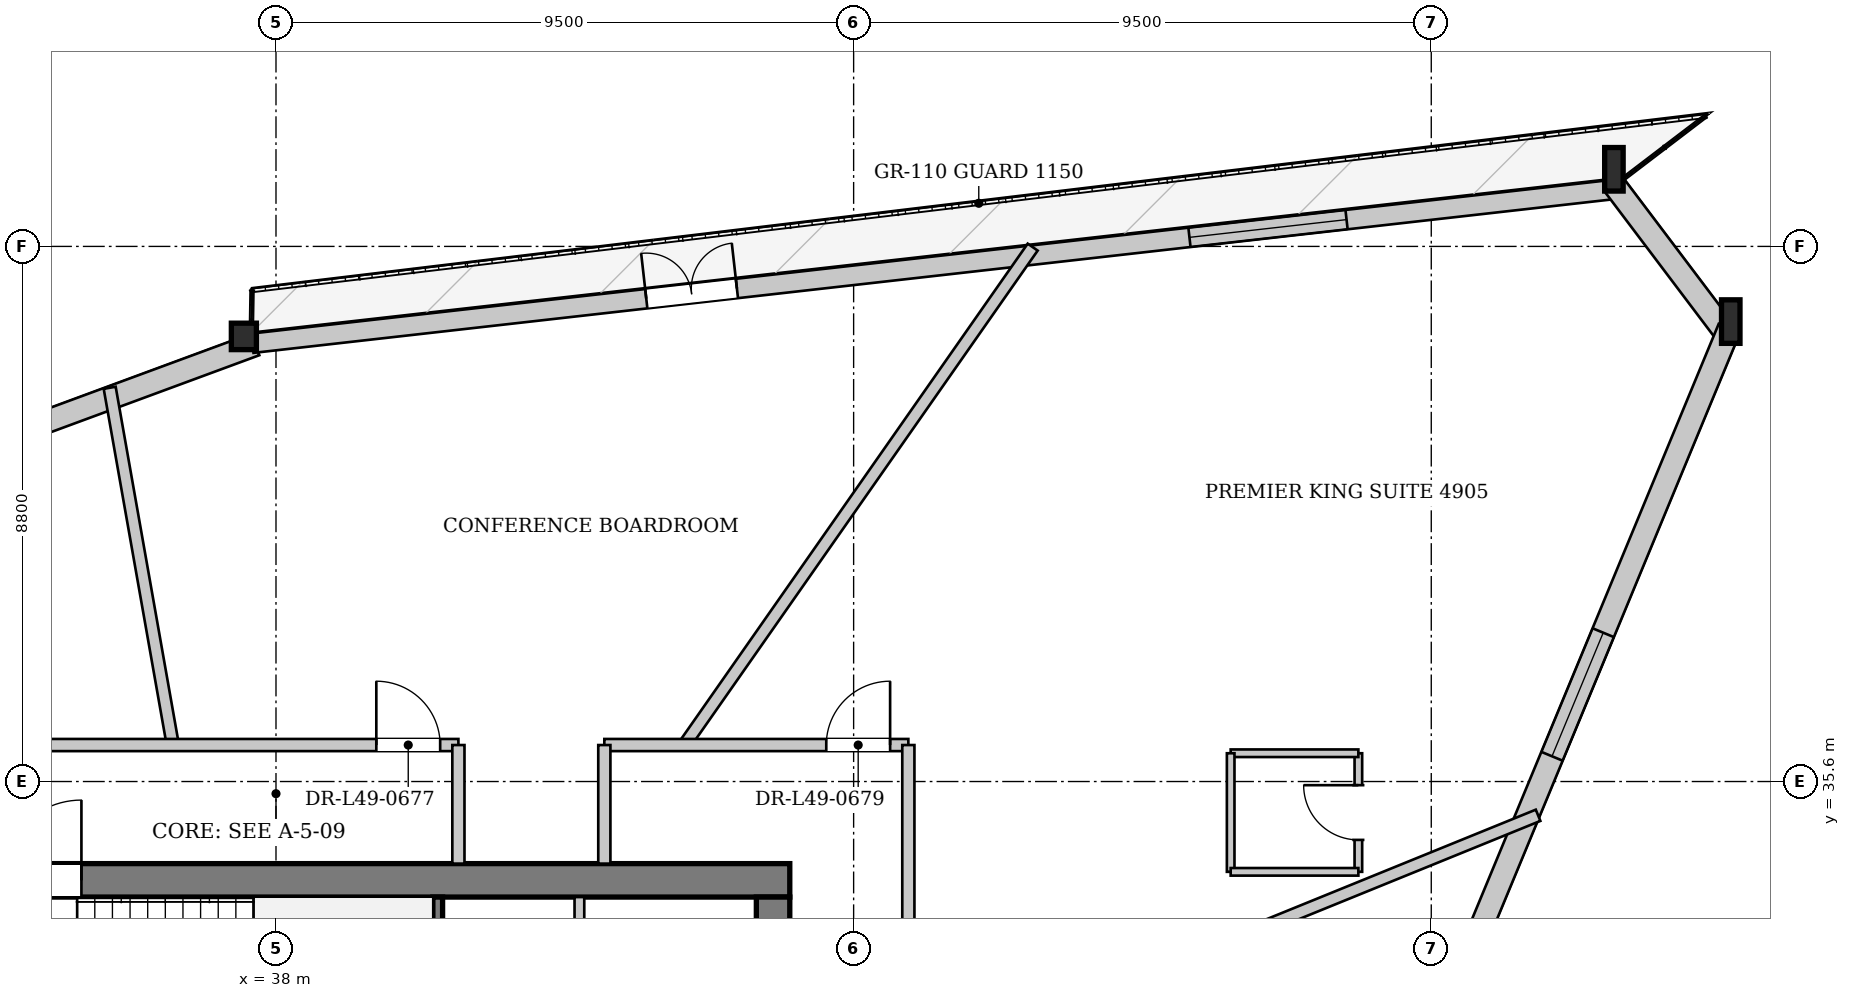
"""IFC4 building model, lengths in metres.
Left out: names, types, materials, properties, quantities, classifications, styles, units other than length and angle.
Written with IfcOpenShell. Run it as: python <this file> out.ifc"""

import sys

from ifc_helpers import new_model, si_unit, direction, frame, frame_2d, origin, origin_2d, place, context, subcontext, project, spatial, rectangle, i_section, extrude, source, transform, mapped, element, fill, save


model = new_model("IFC4")
c1 = context("Model", 3, precision=1e-05, world=origin(), true_north=direction((0.0, 1.0)))
c2 = subcontext(c1, "Body", "Model", "MODEL_VIEW")
j1 = project(units=[si_unit("LENGTHUNIT", "METRE"), si_unit("PLANEANGLEUNIT", "RADIAN")], contexts=[c1])
p1 = place(None, origin())
s1 = spatial("IfcSite", under=j1, at=p1, CompositionType="ELEMENT")
p2 = place(p1, origin())
s2 = spatial("IfcBuilding", under=s1, at=p2, CompositionType="ELEMENT")
p3 = place(p2, frame((0.0, 0.0, 185.65)))
s3 = spatial("IfcBuildingStorey", under=s2, at=p3, CompositionType="ELEMENT", Elevation=185.65)
m1 = source(origin(), c2, "Body", "SweptSolid", [
    extrude(i_section(OverallWidth=0.304, OverallDepth=0.716, WebThickness=0.021, FlangeThickness=0.04, at=origin_2d()), origin(), (0.0, 0.0, 1.0), 3.418),
])
p4 = place(p3, frame((62.079, 42.982, 0.0), z_axis=(-0.089706079585, 0.106418836451, 0.990266555294), x_axis=(-0.764591737576, -0.644514914359, 0.0)))
e1 = element("IfcColumn", 1, at=p4, inside=s3, PredefinedType="COLUMN", context=c2, shape_type="MappedRepresentation", body=[
    mapped(m1, transform((0.0, 0.0, 0.0), x_axis=(1.0, 0.0, 0.0), y_axis=(0.0, 1.0, 0.0), z_axis=(0.0, 0.0, 1.0), scale=1.0)),
])
m2 = source(origin(), c2, "Body", "SweptSolid", [
    extrude(i_section(OverallWidth=0.304, OverallDepth=0.716, WebThickness=0.021, FlangeThickness=0.04, at=origin_2d()), origin(), (0.0, 0.0, 1.0), 3.414),
])
p5 = place(p3, frame((60.165, 45.517, 0.0), z_axis=(-0.094542362552, 0.08882119084, 0.991550572458), x_axis=(-0.684710959005, -0.72881472448, 0.0)))
e2 = element("IfcColumn", 2, at=p5, inside=s3, PredefinedType="COLUMN", context=c2, shape_type="MappedRepresentation", body=[
    mapped(m2, transform((0.0, 0.0, 0.0), x_axis=(1.0, 0.0, 0.0), y_axis=(0.0, 1.0, 0.0), z_axis=(0.0, 0.0, 1.0), scale=1.0)),
])
m3 = source(origin(), c2, "Body", "SweptSolid", [
    extrude(i_section(OverallWidth=0.412, OverallDepth=0.435, WebThickness=0.031, FlangeThickness=0.05, at=origin_2d()), origin(), (0.0, 0.0, 1.0), 3.395),
])
p6 = place(p3, frame((37.594, 42.967, 0.0), z_axis=(-0.072052690953, -0.027684916185, 0.997016527016), x_axis=(0.35866692441, -0.933465605866, 0.0)))
e3 = element("IfcColumn", 3, at=p6, inside=s3, PredefinedType="COLUMN", context=c2, shape_type="MappedRepresentation", body=[
    mapped(m3, transform((0.0, 0.0, 0.0), x_axis=(1.0, 0.0, 0.0), y_axis=(0.0, 1.0, 0.0), z_axis=(0.0, 0.0, 1.0), scale=1.0)),
])
p7 = place(p3, frame((16.351, 34.922, 0.0), z_axis=(0.0, 0.0, 1.0), x_axis=(0.938118125274, 0.346315438629, 0.0)))
e4 = element("IfcWall", 4, at=p7, inside=s3, PredefinedType="SOLIDWALL", context=c2, shape_type="SweptSolid", body=[
    extrude(rectangle(XDim=22.715, YDim=0.38, at=frame_2d((11.357, 0.0))), origin(), (0.0, 0.0, 1.0), 2.722),
])
p8 = place(p7, frame((4.81, 0.0, 0.352)))
e5 = element("IfcOpeningElement", 5, at=p8, cuts=e4, PredefinedType="OPENING", context=c2, shape_type="SweptSolid", body=[
    extrude(rectangle(XDim=2.2, YDim=2.25, at=frame_2d((1.1, 1.125))), frame((0.0, 0.2, 0.0), z_axis=(0.0, -1.0, 0.0), x_axis=(1.0, 0.0, 0.0)), (0.0, 0.0, 1.0), 0.4),
])
p9 = place(p7, frame((15.255, 0.0, 0.352)))
e6 = element("IfcOpeningElement", 6, at=p9, cuts=e4, PredefinedType="OPENING", context=c2, shape_type="SweptSolid", body=[
    extrude(rectangle(XDim=2.2, YDim=2.25, at=frame_2d((1.1, 1.125))), frame((0.0, 0.2, 0.0), z_axis=(0.0, -1.0, 0.0), x_axis=(1.0, 0.0, 0.0)), (0.0, 0.0, 1.0), 0.4),
])
p10 = place(p3, frame((37.612, 42.808, 0.0), z_axis=(0.0, 0.0, 1.0), x_axis=(0.993680751004, 0.112243329794, 0.0)))
e7 = element("IfcWall", 7, at=p10, inside=s3, PredefinedType="SOLIDWALL", context=c2, shape_type="SweptSolid", body=[
    extrude(rectangle(XDim=22.715, YDim=0.32, at=frame_2d((11.357, 0.0))), origin(), (0.0, 0.0, 1.0), 2.722),
])
p11 = place(p10, frame((6.519, 0.0, 0.0)))
e8 = element("IfcOpeningElement", 8, at=p11, cuts=e7, PredefinedType="OPENING", context=c2, shape_type="SweptSolid", body=[
    extrude(rectangle(XDim=1.5, YDim=2.3, at=frame_2d((0.75, 1.15))), frame((0.0, 0.17, 0.0), z_axis=(0.0, -1.0, 0.0), x_axis=(1.0, 0.0, 0.0)), (0.0, 0.0, 1.0), 0.34),
])
p12 = place(p10, frame((15.509, 0.0, 0.252)))
e9 = element("IfcOpeningElement", 9, at=p12, cuts=e7, PredefinedType="OPENING", context=c2, shape_type="SweptSolid", body=[
    extrude(rectangle(XDim=2.6, YDim=2.35, at=frame_2d((1.3, 1.175))), frame((0.0, 0.17, 0.0), z_axis=(0.0, -1.0, 0.0), x_axis=(1.0, 0.0, 0.0)), (0.0, 0.0, 1.0), 0.34),
])
p13 = place(p3, frame((60.014, 45.402, 0.0), z_axis=(0.0, 0.0, 1.0), x_axis=(0.602530725423, -0.79809568657, 0.0)))
e10 = element("IfcWall", 10, at=p13, inside=s3, PredefinedType="SOLIDWALL", context=c2, shape_type="SweptSolid", body=[
    extrude(rectangle(XDim=3.176, YDim=0.38, at=frame_2d((1.588, 0.0))), origin(), (0.0, 0.0, 1.0), 2.722),
])
p14 = place(p3, frame((61.903, 43.055, 0.0), z_axis=(0.0, 0.0, 1.0), x_axis=(-0.382868163496, -0.923802992732, 0.0)))
e11 = element("IfcWall", 11, at=p14, inside=s3, PredefinedType="SOLIDWALL", context=c2, shape_type="SweptSolid", body=[
    extrude(rectangle(XDim=23.285, YDim=0.38, at=frame_2d((11.643, 0.0))), origin(), (0.0, 0.0, 1.0), 2.722),
])
p15 = place(p14, frame((5.42, 0.0, 0.352)))
e12 = element("IfcOpeningElement", 12, at=p15, cuts=e11, PredefinedType="OPENING", context=c2, shape_type="SweptSolid", body=[
    extrude(rectangle(XDim=2.2, YDim=2.25, at=frame_2d((1.1, 1.125))), frame((0.0, 0.2, 0.0), z_axis=(0.0, -1.0, 0.0), x_axis=(1.0, 0.0, 0.0)), (0.0, 0.0, 1.0), 0.4),
])
p16 = place(p14, frame((15.665, 0.0, 0.352)))
e13 = element("IfcOpeningElement", 13, at=p16, cuts=e11, PredefinedType="OPENING", context=c2, shape_type="SweptSolid", body=[
    extrude(rectangle(XDim=2.2, YDim=2.25, at=frame_2d((1.1, 1.125))), frame((0.0, 0.2, 0.0), z_axis=(0.0, -1.0, 0.0), x_axis=(1.0, 0.0, 0.0)), (0.0, 0.0, 1.0), 0.4),
])
p17 = place(p3, frame((29.55, 33.975, 0.0), z_axis=(0.0, 0.0, 1.0), x_axis=(1.0, 0.0, 0.0)))
e14 = element("IfcWall", 14, at=p17, inside=s3, PredefinedType="SHEAR", context=c2, shape_type="SweptSolid", body=[
    extrude(rectangle(XDim=16.9, YDim=0.55, at=frame_2d((8.45, 0.0))), origin(), (0.0, 0.0, 1.0), 3.33),
])
p18 = place(p17, frame((1.55, 0.0, 0.0)))
e15 = element("IfcOpeningElement", 15, at=p18, cuts=e14, PredefinedType="OPENING", context=c2, shape_type="SweptSolid", body=[
    extrude(rectangle(XDim=0.95, YDim=2.1, at=frame_2d((0.475, 1.05))), frame((0.0, 0.285, 0.0), z_axis=(0.0, -1.0, 0.0), x_axis=(1.0, 0.0, 0.0)), (0.0, 0.0, 1.0), 0.57),
])
p19 = place(p17, frame((3.93, 0.0, 0.0)))
e16 = element("IfcOpeningElement", 16, at=p19, cuts=e14, PredefinedType="OPENING", context=c2, shape_type="SweptSolid", body=[
    extrude(rectangle(XDim=1.32, YDim=2.2, at=frame_2d((0.66, 1.1))), frame((0.0, 0.285, 0.0), z_axis=(0.0, -1.0, 0.0), x_axis=(1.0, 0.0, 0.0)), (0.0, 0.0, 1.0), 0.57),
])
p20 = place(p3, frame((46.175, 33.7, 0.0), z_axis=(0.0, 0.0, 1.0), x_axis=(0.0, -1.0, 0.0)))
e17 = element("IfcWall", 17, at=p20, inside=s3, PredefinedType="SHEAR", context=c2, shape_type="SweptSolid", body=[
    extrude(rectangle(XDim=14.2, YDim=0.55, at=frame_2d((7.1, 0.0))), origin(), (0.0, 0.0, 1.0), 3.33),
])
p21 = place(p20, frame((5.18, 0.0, 0.0)))
e18 = element("IfcOpeningElement", 18, at=p21, cuts=e17, PredefinedType="OPENING", context=c2, shape_type="SweptSolid", body=[
    extrude(rectangle(XDim=1.6, YDim=2.2, at=frame_2d((0.8, 1.1))), frame((0.0, 0.285, 0.0), z_axis=(0.0, -1.0, 0.0), x_axis=(1.0, 0.0, 0.0)), (0.0, 0.0, 1.0), 0.57),
])
p22 = place(p20, frame((2.05, 0.0, 0.0)))
e19 = element("IfcOpeningElement", 19, at=p22, cuts=e17, PredefinedType="OPENING", context=c2, shape_type="SweptSolid", body=[
    extrude(rectangle(XDim=0.95, YDim=2.1, at=frame_2d((0.475, 1.05))), frame((0.0, 0.285, 0.0), z_axis=(0.0, -1.0, 0.0), x_axis=(1.0, 0.0, 0.0)), (0.0, 0.0, 1.0), 0.57),
])
p23 = place(p3, frame((40.66, 30.6, 0.0), z_axis=(0.0, 0.0, 1.0), x_axis=(0.0, 1.0, 0.0)))
e20 = element("IfcWall", 20, at=p23, inside=s3, PredefinedType="PARTITIONING", context=c2, shape_type="SweptSolid", body=[
    extrude(rectangle(XDim=3.1, YDim=0.16, at=frame_2d((1.55, 0.0))), origin(), (0.0, 0.0, 1.0), 3.33),
])
p24 = place(p3, frame((42.99, 30.68, 0.0), z_axis=(0.0, 0.0, 1.0), x_axis=(0.0, 1.0, 0.0)))
e21 = element("IfcWall", 21, at=p24, inside=s3, PredefinedType="PARTITIONING", context=c2, shape_type="SweptSolid", body=[
    extrude(rectangle(XDim=3.02, YDim=0.16, at=frame_2d((1.51, 0.0))), origin(), (0.0, 0.0, 1.0), 3.33),
])
p25 = place(p24, frame((0.95, 0.0, 0.0)))
e22 = element("IfcOpeningElement", 22, at=p25, cuts=e21, PredefinedType="OPENING", context=c2, shape_type="SweptSolid", body=[
    extrude(rectangle(XDim=0.95, YDim=2.1, at=frame_2d((0.475, 1.05))), frame((0.0, 0.09, 0.0), z_axis=(0.0, -1.0, 0.0), x_axis=(1.0, 0.0, 0.0)), (0.0, 0.0, 1.0), 0.18),
])
p26 = place(p3, frame((48.4, 30.831, 0.0), z_axis=(0.0, 0.0, 1.0), x_axis=(0.926275636958, 0.376846712042, 0.0)))
e23 = element("IfcWall", 23, at=p26, inside=s3, PredefinedType="PARTITIONING", context=c2, shape_type="SweptSolid", body=[
    extrude(rectangle(XDim=11.181, YDim=0.2, at=frame_2d((5.591, 0.0))), origin(), (0.0, 0.0, 1.0), 3.33),
])
p27 = place(p3, frame((44.716, 36.2, 0.0), z_axis=(0.0, 0.0, 1.0), x_axis=(0.573232775322, 0.819392570931, 0.0)))
e24 = element("IfcWall", 24, at=p27, inside=s3, PredefinedType="PARTITIONING", context=c2, shape_type="SweptSolid", body=[
    extrude(rectangle(XDim=9.993, YDim=0.2, at=frame_2d((4.997, 0.0))), origin(), (0.0, 0.0, 1.0), 3.33),
])
p28 = place(p3, frame((36.303, 36.2, 0.0), z_axis=(0.0, 0.0, 1.0), x_axis=(-0.174032770855, 0.98473986142, 0.0)))
e25 = element("IfcWall", 25, at=p28, inside=s3, PredefinedType="PARTITIONING", context=c2, shape_type="SweptSolid", body=[
    extrude(rectangle(XDim=5.966, YDim=0.2, at=frame_2d((2.983, 0.0))), origin(), (0.0, 0.0, 1.0), 3.33),
])
p29 = place(p3, frame((55.801, 34.115, 0.0), z_axis=(0.0, 0.0, 1.0), x_axis=(0.0, 1.0, 0.0)))
e26 = element("IfcWall", 26, at=p29, inside=s3, PredefinedType="PARTITIONING", context=c2, shape_type="SweptSolid", body=[
    extrude(rectangle(XDim=1.95, YDim=0.125, at=frame_2d((0.975, 0.0))), origin(), (0.0, 0.0, 1.0), 3.33),
])
p30 = place(p29, frame((0.525, 0.0, 0.0)))
e27 = element("IfcOpeningElement", 27, at=p30, cuts=e26, PredefinedType="OPENING", context=c2, shape_type="SweptSolid", body=[
    extrude(rectangle(XDim=0.9, YDim=2.1, at=frame_2d((0.45, 1.05))), frame((0.0, 0.073, 0.0), z_axis=(0.0, -1.0, 0.0), x_axis=(1.0, 0.0, 0.0)), (0.0, 0.0, 1.0), 0.145),
])
p31 = place(p3, frame((55.801, 36.065, 0.0), z_axis=(0.0, 0.0, 1.0), x_axis=(-1.0, 0.0, 0.0)))
e28 = element("IfcWall", 28, at=p31, inside=s3, PredefinedType="PARTITIONING", context=c2, shape_type="SweptSolid", body=[
    extrude(rectangle(XDim=2.1, YDim=0.125, at=frame_2d((1.05, 0.0))), origin(), (0.0, 0.0, 1.0), 3.33),
])
p32 = place(p3, frame((53.701, 36.065, 0.0), z_axis=(0.0, 0.0, 1.0), x_axis=(0.0, -1.0, 0.0)))
e29 = element("IfcWall", 29, at=p32, inside=s3, PredefinedType="PARTITIONING", context=c2, shape_type="SweptSolid", body=[
    extrude(rectangle(XDim=1.95, YDim=0.125, at=frame_2d((0.975, 0.0))), origin(), (0.0, 0.0, 1.0), 3.33),
])
p33 = place(p3, frame((53.701, 34.115, 0.0), z_axis=(0.0, 0.0, 1.0), x_axis=(1.0, 0.0, 0.0)))
e30 = element("IfcWall", 30, at=p33, inside=s3, PredefinedType="PARTITIONING", context=c2, shape_type="SweptSolid", body=[
    extrude(rectangle(XDim=2.1, YDim=0.125, at=frame_2d((1.05, 0.0))), origin(), (0.0, 0.0, 1.0), 3.33),
])
p34 = place(p3, frame((27.6, 36.2, 0.0), z_axis=(0.0, 0.0, 1.0), x_axis=(1.0, 0.0, 0.0)))
e31 = element("IfcWall", 31, at=p34, inside=s3, PredefinedType="PARTITIONING", context=c2, shape_type="SweptSolid", body=[
    extrude(rectangle(XDim=13.4, YDim=0.2, at=frame_2d((6.7, 0.0))), origin(), (0.0, 0.0, 1.0), 3.33),
])
p35 = place(p34, frame((12.05, 0.0, 0.0)))
e32 = element("IfcOpeningElement", 32, at=p35, cuts=e31, PredefinedType="OPENING", context=c2, shape_type="SweptSolid", body=[
    extrude(rectangle(XDim=1.05, YDim=2.2, at=frame_2d((0.525, 1.1))), frame((0.0, 0.11, 0.0), z_axis=(0.0, -1.0, 0.0), x_axis=(1.0, 0.0, 0.0)), (0.0, 0.0, 1.0), 0.22),
])
p36 = place(p34, frame((4.575, 0.0, 0.0)))
e33 = element("IfcOpeningElement", 33, at=p36, cuts=e31, PredefinedType="OPENING", context=c2, shape_type="SweptSolid", body=[
    extrude(rectangle(XDim=1.05, YDim=2.2, at=frame_2d((0.525, 1.1))), frame((0.0, 0.11, 0.0), z_axis=(0.0, -1.0, 0.0), x_axis=(1.0, 0.0, 0.0)), (0.0, 0.0, 1.0), 0.22),
])
p37 = place(p3, frame((41.0, 34.25, 0.0), z_axis=(0.0, 0.0, 1.0), x_axis=(0.0, 1.0, 0.0)))
e34 = element("IfcWall", 34, at=p37, inside=s3, PredefinedType="PARTITIONING", context=c2, shape_type="SweptSolid", body=[
    extrude(rectangle(XDim=1.95, YDim=0.2, at=frame_2d((0.975, 0.0))), origin(), (0.0, 0.0, 1.0), 3.33),
])
p38 = place(p3, frame((43.4, 36.2, 0.0), z_axis=(0.0, 0.0, 1.0), x_axis=(1.0, 0.0, 0.0)))
e35 = element("IfcWall", 35, at=p38, inside=s3, PredefinedType="PARTITIONING", context=c2, shape_type="SweptSolid", body=[
    extrude(rectangle(XDim=5.0, YDim=0.2, at=frame_2d((2.5, 0.0))), origin(), (0.0, 0.0, 1.0), 3.33),
])
p39 = place(p38, frame((3.65, 0.0, 0.0)))
e36 = element("IfcOpeningElement", 36, at=p39, cuts=e35, PredefinedType="OPENING", context=c2, shape_type="SweptSolid", body=[
    extrude(rectangle(XDim=1.05, YDim=2.2, at=frame_2d((0.525, 1.1))), frame((0.0, 0.11, 0.0), z_axis=(0.0, -1.0, 0.0), x_axis=(1.0, 0.0, 0.0)), (0.0, 0.0, 1.0), 0.22),
])
p40 = place(p3, frame((43.4, 34.25, 0.0), z_axis=(0.0, 0.0, 1.0), x_axis=(0.0, 1.0, 0.0)))
e37 = element("IfcWall", 37, at=p40, inside=s3, PredefinedType="PARTITIONING", context=c2, shape_type="SweptSolid", body=[
    extrude(rectangle(XDim=1.95, YDim=0.2, at=frame_2d((0.975, 0.0))), origin(), (0.0, 0.0, 1.0), 3.33),
])
p41 = place(p3, frame((48.4, 17.0, 0.0), z_axis=(0.0, 0.0, 1.0), x_axis=(0.0, 1.0, 0.0)))
e38 = element("IfcWall", 38, at=p41, inside=s3, PredefinedType="PARTITIONING", context=c2, shape_type="SweptSolid", body=[
    extrude(rectangle(XDim=19.2, YDim=0.2, at=frame_2d((9.6, 0.0))), origin(), (0.0, 0.0, 1.0), 3.33),
])
p42 = place(p41, frame((1.794, 0.0, 0.0)))
e39 = element("IfcOpeningElement", 39, at=p42, cuts=e38, PredefinedType="OPENING", context=c2, shape_type="SweptSolid", body=[
    extrude(rectangle(XDim=1.05, YDim=2.2, at=frame_2d((0.525, 1.1))), frame((0.0, 0.11, 0.0), z_axis=(0.0, -1.0, 0.0), x_axis=(1.0, 0.0, 0.0)), (0.0, 0.0, 1.0), 0.22),
])
p43 = place(p41, frame((9.465, 0.0, 0.0)))
e40 = element("IfcOpeningElement", 40, at=p43, cuts=e38, PredefinedType="OPENING", context=c2, shape_type="SweptSolid", body=[
    extrude(rectangle(XDim=1.05, YDim=2.2, at=frame_2d((0.525, 1.1))), frame((0.0, 0.11, 0.0), z_axis=(0.0, -1.0, 0.0), x_axis=(1.0, 0.0, 0.0)), (0.0, 0.0, 1.0), 0.22),
])
m4 = source(origin(), c2, "Body", "SweptSolid", [
    extrude(rectangle(XDim=1.5, YDim=2.3, at=frame_2d((0.75, 1.15))), frame((0.0, 0.025, 0.0), z_axis=(0.0, -1.0, 0.0), x_axis=(1.0, 0.0, 0.0)), (0.0, 0.0, 1.0), 0.05),
])
p44 = place(p11, origin())
e41 = element("IfcDoor", 41, at=p44, inside=s3, OperationType="DOUBLE_DOOR_SINGLE_SWING", PredefinedType="DOOR", context=c2, shape_type="MappedRepresentation", body=[
    mapped(m4, transform((0.0, 0.0, 0.0), x_axis=(1.0, 0.0, 0.0), y_axis=(0.0, 1.0, 0.0), z_axis=(0.0, 0.0, 1.0), scale=1.0)),
])
fill(e8, e41)
m5 = source(origin(), c2, "Body", "SweptSolid", [
    extrude(rectangle(XDim=2.6, YDim=2.35, at=frame_2d((1.3, 1.175))), frame((0.0, 0.03, 0.0), z_axis=(0.0, -1.0, 0.0), x_axis=(1.0, 0.0, 0.0)), (0.0, 0.0, 1.0), 0.06),
])
p45 = place(p12, origin())
e42 = element("IfcWindow", 42, at=p45, inside=s3, PartitioningType="SINGLE_PANEL", PredefinedType="WINDOW", context=c2, shape_type="MappedRepresentation", body=[
    mapped(m5, transform((0.0, 0.0, 0.0), x_axis=(1.0, 0.0, 0.0), y_axis=(0.0, 1.0, 0.0), z_axis=(0.0, 0.0, 1.0), scale=1.0)),
])
fill(e9, e42)
m6 = source(origin(), c2, "Body", "SweptSolid", [
    extrude(rectangle(XDim=2.2, YDim=2.25, at=frame_2d((1.1, 1.125))), frame((0.0, 0.03, 0.0), z_axis=(0.0, -1.0, 0.0), x_axis=(1.0, 0.0, 0.0)), (0.0, 0.0, 1.0), 0.06),
])
p46 = place(p15, origin())
e43 = element("IfcWindow", 43, at=p46, inside=s3, PartitioningType="SINGLE_PANEL", PredefinedType="WINDOW", context=c2, shape_type="MappedRepresentation", body=[
    mapped(m6, transform((0.0, 0.0, 0.0), x_axis=(1.0, 0.0, 0.0), y_axis=(0.0, 1.0, 0.0), z_axis=(0.0, 0.0, 1.0), scale=1.0)),
])
fill(e12, e43)
m7 = source(origin(), c2, "Body", "SweptSolid", [
    extrude(rectangle(XDim=1.32, YDim=2.2, at=frame_2d((0.66, 1.1))), frame((0.0, 0.025, 0.0), z_axis=(0.0, -1.0, 0.0), x_axis=(1.0, 0.0, 0.0)), (0.0, 0.0, 1.0), 0.05),
])
p47 = place(p19, origin())
e44 = element("IfcDoor", 44, at=p47, inside=s3, OperationType="SINGLE_SWING_RIGHT", PredefinedType="DOOR", context=c2, shape_type="MappedRepresentation", body=[
    mapped(m7, transform((0.0, 0.0, 0.0), x_axis=(1.0, 0.0, 0.0), y_axis=(0.0, 1.0, 0.0), z_axis=(0.0, 0.0, 1.0), scale=1.0)),
])
fill(e16, e44)
m8 = source(origin(), c2, "Body", "SweptSolid", [
    extrude(rectangle(XDim=0.9, YDim=2.1, at=frame_2d((0.45, 1.05))), frame((0.0, 0.025, 0.0), z_axis=(0.0, -1.0, 0.0), x_axis=(1.0, 0.0, 0.0)), (0.0, 0.0, 1.0), 0.05),
])
p48 = place(p30, origin())
e45 = element("IfcDoor", 45, at=p48, inside=s3, OperationType="SINGLE_SWING_RIGHT", PredefinedType="DOOR", context=c2, shape_type="MappedRepresentation", body=[
    mapped(m8, transform((0.0, 0.0, 0.0), x_axis=(1.0, 0.0, 0.0), y_axis=(0.0, 1.0, 0.0), z_axis=(0.0, 0.0, 1.0), scale=1.0)),
])
fill(e27, e45)
m9 = source(origin(), c2, "Body", "SweptSolid", [
    extrude(rectangle(XDim=1.05, YDim=2.2, at=frame_2d((0.525, 1.1))), frame((0.0, 0.025, 0.0), z_axis=(0.0, -1.0, 0.0), x_axis=(1.0, 0.0, 0.0)), (0.0, 0.0, 1.0), 0.05),
])
p49 = place(p35, origin())
e46 = element("IfcDoor", 46, at=p49, inside=s3, OperationType="SINGLE_SWING_LEFT", PredefinedType="DOOR", context=c2, shape_type="MappedRepresentation", body=[
    mapped(m9, transform((0.0, 0.0, 0.0), x_axis=(1.0, 0.0, 0.0), y_axis=(0.0, 1.0, 0.0), z_axis=(0.0, 0.0, 1.0), scale=1.0)),
])
fill(e32, e46)
p50 = place(p39, origin())
e47 = element("IfcDoor", 47, at=p50, inside=s3, OperationType="SINGLE_SWING_RIGHT", PredefinedType="DOOR", context=c2, shape_type="MappedRepresentation", body=[
    mapped(m9, transform((0.0, 0.0, 0.0), x_axis=(1.0, 0.0, 0.0), y_axis=(0.0, 1.0, 0.0), z_axis=(0.0, 0.0, 1.0), scale=1.0)),
])
fill(e36, e47)
save(model, sys.argv[1])
